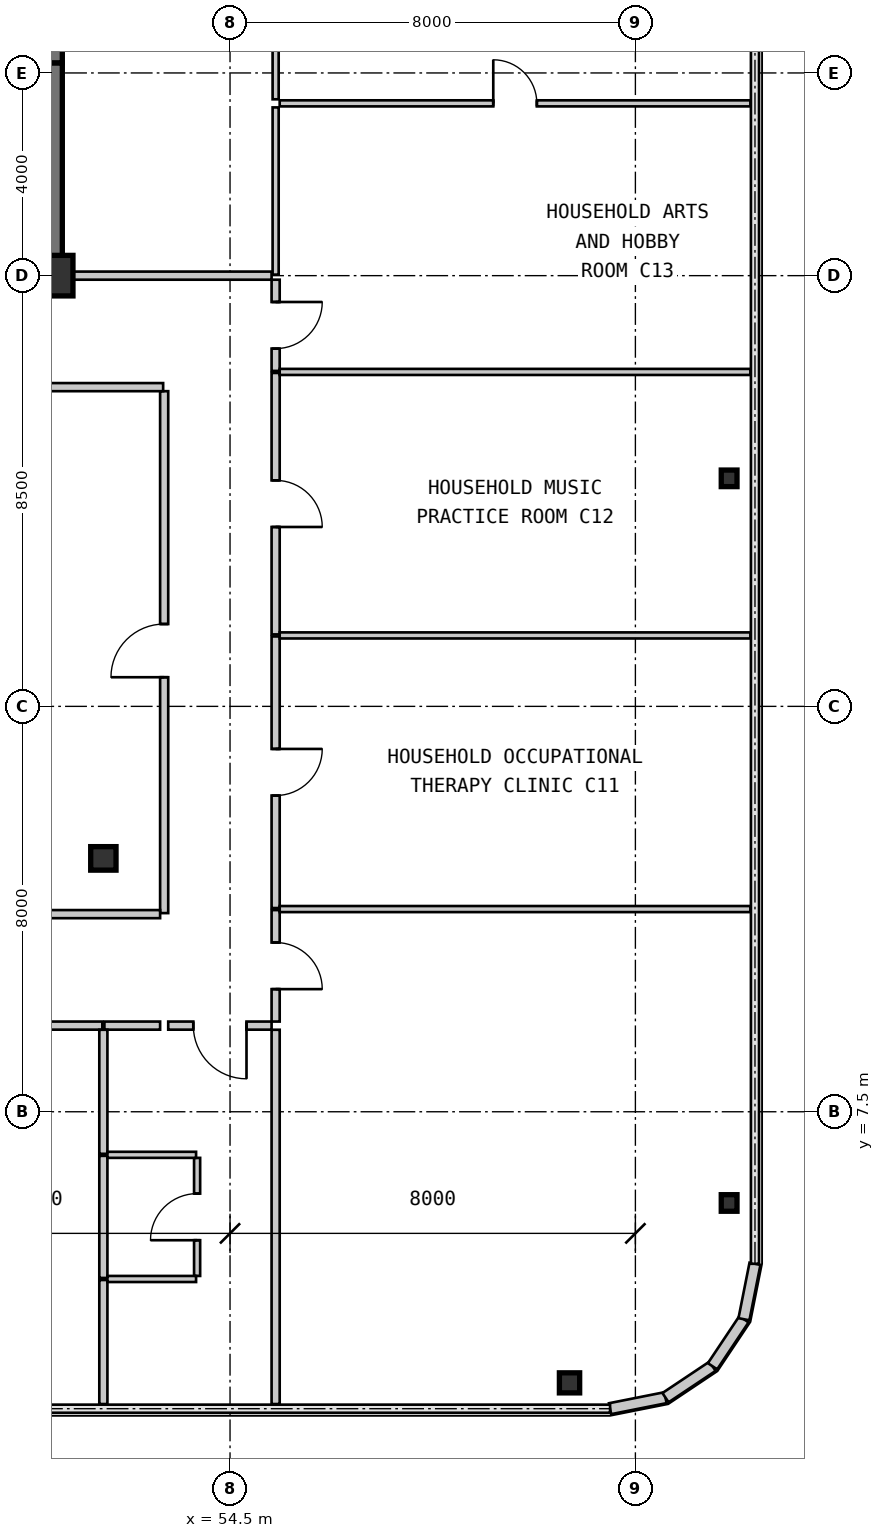
"""IFC4 building model, lengths in metres.
Left out: names, types, materials, properties, quantities, classifications, styles, units other than length and angle.
Written with IfcOpenShell. Run it as: python <this file> out.ifc"""

import sys

from ifc_helpers import new_model, si_unit, direction, frame, frame_2d, origin, origin_2d, place, context, subcontext, project, spatial, rectangle, i_section, extrude, source, transform, mapped, element, fill, save


model = new_model("IFC4")
c1 = context("Model", 3, precision=1e-05, world=origin(), true_north=direction((0.0, 1.0)))
c2 = subcontext(c1, "Body", "Model", "MODEL_VIEW")
j1 = project(units=[si_unit("LENGTHUNIT", "METRE"), si_unit("PLANEANGLEUNIT", "RADIAN")], contexts=[c1])
p1 = place(None, origin())
s1 = spatial("IfcSite", under=j1, at=p1, CompositionType="ELEMENT")
p2 = place(p1, origin())
s2 = spatial("IfcBuilding", under=s1, at=p2, CompositionType="ELEMENT")
p3 = place(p2, frame((0.0, 0.0, 51.45)))
s3 = spatial("IfcBuildingStorey", under=s2, at=p3, CompositionType="ELEMENT", Elevation=51.45)
m1 = source(origin(), c2, "Body", "SweptSolid", [
    extrude(rectangle(XDim=0.8, YDim=0.8, at=origin_2d()), origin(), (0.0, 0.0, 1.0), 3.15),
])
p4 = place(p3, frame((51.0, 24.0, 0.0), z_axis=(0.0, 0.0, 1.0), x_axis=(1.0, 0.0, 0.0)))
e1 = element("IfcColumn", 1, at=p4, inside=s3, PredefinedType="COLUMN", context=c2, shape_type="MappedRepresentation", body=[
    mapped(m1, transform((0.0, 0.0, 0.0), scale=1.0)),
])
m2 = source(origin(), c2, "Body", "SweptSolid", [
    extrude(i_section(OverallWidth=0.5, OverallDepth=0.464, WebThickness=0.022, FlangeThickness=0.034, at=origin_2d()), origin(), (0.0, 0.0, 1.0), 3.15),
])
p5 = place(p3, frame((52.0, 12.5, 0.0), z_axis=(0.0, 0.0, 1.0), x_axis=(1.0, 0.0, 0.0)))
e2 = element("IfcColumn", 2, at=p5, inside=s3, PredefinedType="COLUMN", context=c2, shape_type="MappedRepresentation", body=[
    mapped(m2, transform((0.0, 0.0, 0.0), scale=1.0)),
])
m3 = source(origin(), c2, "Body", "SweptSolid", [
    extrude(i_section(OverallWidth=0.4, OverallDepth=0.396, WebThickness=0.022, FlangeThickness=0.034, at=origin_2d()), origin(), (0.0, 0.0, 1.0), 3.15),
])
p6 = place(p3, frame((61.2, 2.15, 0.0), z_axis=(0.0, 0.0, 1.0), x_axis=(1.0, 0.0, 0.0)))
e3 = element("IfcColumn", 3, at=p6, inside=s3, PredefinedType="COLUMN", context=c2, shape_type="MappedRepresentation", body=[
    mapped(m3, transform((0.0, 0.0, 0.0), scale=1.0)),
])
m4 = source(origin(), c2, "Body", "SweptSolid", [
    extrude(i_section(OverallWidth=0.311, OverallDepth=0.327, WebThickness=0.016, FlangeThickness=0.025, at=origin_2d()), origin(), (0.0, 0.0, 1.0), 3.15),
])
for number, where, z_axis, x_axis in (
    (4, (64.35, 5.7, 0.0), (0.0, 0.0, 1.0), (1.0, 0.0, 0.0)),
    (5, (64.35, 20.0, 0.0), (0.0, 0.0, 1.0), (1.0, 0.0, 0.0)),
):
    element("IfcColumn", number, at=place(p3, frame(where, z_axis=z_axis, x_axis=x_axis)), inside=s3, PredefinedType="COLUMN", context=c2, shape_type="MappedRepresentation", body=[
        mapped(m4, transform((0.0, 0.0, 0.0), scale=1.0)),
    ])
m5 = source(origin(), c2, "Body", "SweptSolid", [
    extrude(rectangle(XDim=1.116, YDim=0.22, at=frame_2d((0.558, 0.0))), origin(), (0.0, 0.0, 1.0), 2.93),
])
for number, where, z_axis, x_axis in (
    (6, (62.0, 1.64, 0.0), (0.0, 0.0, 1.0), (0.981, 0.195, 0.0)),
    (7, (63.094, 1.858, 0.0), (0.0, 0.0, 1.0), (0.831, 0.556, 0.0)),
    (8, (64.022, 2.478, 0.0), (0.0, 0.0, 1.0), (0.556, 0.831, 0.0)),
    (9, (64.642, 3.406, 0.0), (0.0, 0.0, 1.0), (0.195, 0.981, 0.0)),
):
    element("IfcWall", number, at=place(p3, frame(where, z_axis=z_axis, x_axis=x_axis)), inside=s3, PredefinedType="SOLIDWALL", context=c2, shape_type="MappedRepresentation", body=[
        mapped(m5, transform((0.0, 0.0, 0.0), scale=1.0)),
    ])
m6 = source(origin(), c2, "Body", "SweptSolid", [
    extrude(rectangle(XDim=4.01, YDim=0.38, at=frame_2d((2.005, 0.0))), origin(), (0.0, 0.0, 1.0), 2.93),
])
p7 = place(p3, frame((51.0, 24.19, 0.0), z_axis=(0.0, 0.0, 1.0), x_axis=(0.0, 1.0, 0.0)))
e10 = element("IfcWall", 10, at=p7, inside=s3, PredefinedType="SHEAR", context=c2, shape_type="MappedRepresentation", body=[
    mapped(m6, transform((0.0, 0.0, 0.0), scale=1.0)),
])
m7 = source(origin(), c2, "Body", "SweptSolid", [
    extrude(rectangle(XDim=3.61, YDim=0.38, at=frame_2d((1.805, 0.0))), origin(), (0.0, 0.0, 1.0), 2.93),
])
p8 = place(p3, frame((51.0, 28.2, 0.0), z_axis=(0.0, 0.0, 1.0), x_axis=(0.0, 1.0, 0.0)))
e11 = element("IfcWall", 11, at=p8, inside=s3, PredefinedType="SHEAR", context=c2, shape_type="MappedRepresentation", body=[
    mapped(m7, transform((0.0, 0.0, 0.0), scale=1.0)),
])
m8 = source(origin(), c2, "Body", "SweptSolid", [
    extrude(rectangle(XDim=4.98, YDim=0.38, at=frame_2d((2.49, 0.0))), origin(), (0.0, 0.0, 1.0), 2.93),
])
p9 = place(p3, frame((46.21, 24.0, 0.0), z_axis=(0.0, 0.0, 1.0), x_axis=(1.0, 0.0, 0.0)))
e12 = element("IfcWall", 12, at=p9, inside=s3, PredefinedType="SHEAR", context=c2, shape_type="MappedRepresentation", body=[
    mapped(m8, transform((0.0, 0.0, 0.0), scale=1.0)),
])
m9 = source(origin(), c2, "Body", "SweptSolid", [
    extrude(rectangle(XDim=10.3, YDim=0.16, at=frame_2d((5.15, 0.0))), origin(), (0.0, 0.0, 1.0), 2.93),
])
p10 = place(p3, frame((53.2, 11.42, 0.0), z_axis=(0.0, 0.0, 1.0), x_axis=(0.0, 1.0, 0.0)))
e13 = element("IfcWall", 13, at=p10, inside=s3, PredefinedType="PARTITIONING", context=c2, shape_type="MappedRepresentation", body=[
    mapped(m9, transform((0.0, 0.0, 0.0), scale=1.0)),
])
m10 = source(origin(), c2, "Body", "SweptSolid", [
    extrude(rectangle(XDim=1.05, YDim=2.1, at=frame_2d((0.525, 1.05))), frame((0.0, 0.09, 0.0), z_axis=(0.0, -1.0, 0.0), x_axis=(1.0, 0.0, 0.0)), (0.0, 0.0, 1.0), 0.18),
])
p11 = place(p10, frame((4.655, 0.0, 0.0)))
e14 = element("IfcOpeningElement", 14, at=p11, cuts=e13, PredefinedType="OPENING", context=c2, shape_type="MappedRepresentation", body=[
    mapped(m10, transform((0.0, 0.0, 0.0), scale=1.0)),
])
m11 = source(origin(), c2, "Body", "SweptSolid", [
    extrude(rectangle(XDim=7.56, YDim=0.16, at=frame_2d((3.78, 0.0))), origin(), (0.0, 0.0, 1.0), 2.93),
])
p12 = place(p3, frame((53.18, 21.8, 0.0), z_axis=(0.0, 0.0, 1.0), x_axis=(-1.0, 0.0, 0.0)))
e15 = element("IfcWall", 15, at=p12, inside=s3, PredefinedType="PARTITIONING", context=c2, shape_type="MappedRepresentation", body=[
    mapped(m11, transform((0.0, 0.0, 0.0), scale=1.0)),
])
m12 = source(origin(), c2, "Body", "SweptSolid", [
    extrude(rectangle(XDim=2.04, YDim=0.16, at=frame_2d((1.02, 0.0))), origin(), (0.0, 0.0, 1.0), 2.93),
])
p13 = place(p3, frame((55.32, 9.2, 0.0), z_axis=(0.0, 0.0, 1.0), x_axis=(-1.0, 0.0, 0.0)))
e16 = element("IfcWall", 16, at=p13, inside=s3, PredefinedType="PARTITIONING", context=c2, shape_type="MappedRepresentation", body=[
    mapped(m12, transform((0.0, 0.0, 0.0), scale=1.0)),
])
p14 = place(p13, frame((0.495, 0.0, 0.0)))
e17 = element("IfcOpeningElement", 17, at=p14, cuts=e16, PredefinedType="OPENING", context=c2, shape_type="MappedRepresentation", body=[
    mapped(m10, transform((0.0, 0.0, 0.0), scale=1.0)),
])
m13 = source(origin(), c2, "Body", "SweptSolid", [
    extrude(rectangle(XDim=2.2, YDim=0.16, at=frame_2d((1.1, 0.0))), origin(), (0.0, 0.0, 1.0), 2.93),
])
p15 = place(p3, frame((55.4, 11.48, 0.0), z_axis=(0.0, 0.0, 1.0), x_axis=(0.0, -1.0, 0.0)))
e18 = element("IfcWall", 18, at=p15, inside=s3, PredefinedType="PARTITIONING", context=c2, shape_type="MappedRepresentation", body=[
    mapped(m13, transform((0.0, 0.0, 0.0), scale=1.0)),
])
m14 = source(origin(), c2, "Body", "SweptSolid", [
    extrude(rectangle(XDim=0.92, YDim=2.1, at=frame_2d((0.46, 1.05))), frame((0.0, 0.09, 0.0), z_axis=(0.0, -1.0, 0.0), x_axis=(1.0, 0.0, 0.0)), (0.0, 0.0, 1.0), 0.18),
])
p16 = place(p15, frame((0.64, 0.0, 0.0)))
e19 = element("IfcOpeningElement", 19, at=p16, cuts=e18, PredefinedType="OPENING", context=c2, shape_type="MappedRepresentation", body=[
    mapped(m14, transform((0.0, 0.0, 0.0), scale=1.0)),
])
m15 = source(origin(), c2, "Body", "SweptSolid", [
    extrude(rectangle(XDim=5.36, YDim=0.16, at=frame_2d((2.68, 0.0))), origin(), (0.0, 0.0, 1.0), 2.93),
])
p17 = place(p3, frame((55.4, 16.88, 0.0), z_axis=(0.0, 0.0, 1.0), x_axis=(0.0, -1.0, 0.0)))
e20 = element("IfcWall", 20, at=p17, inside=s3, PredefinedType="PARTITIONING", context=c2, shape_type="MappedRepresentation", body=[
    mapped(m15, transform((0.0, 0.0, 0.0), scale=1.0)),
])
p18 = place(p17, frame((2.22, 0.0, 0.0)))
e21 = element("IfcOpeningElement", 21, at=p18, cuts=e20, PredefinedType="OPENING", context=c2, shape_type="MappedRepresentation", body=[
    mapped(m14, transform((0.0, 0.0, 0.0), scale=1.0)),
])
m16 = source(origin(), c2, "Body", "SweptSolid", [
    extrude(rectangle(XDim=5.16, YDim=0.16, at=frame_2d((2.58, 0.0))), origin(), (0.0, 0.0, 1.0), 2.93),
])
p19 = place(p3, frame((55.4, 22.08, 0.0), z_axis=(0.0, 0.0, 1.0), x_axis=(0.0, -1.0, 0.0)))
e22 = element("IfcWall", 22, at=p19, inside=s3, PredefinedType="PARTITIONING", context=c2, shape_type="MappedRepresentation", body=[
    mapped(m16, transform((0.0, 0.0, 0.0), scale=1.0)),
])
p20 = place(p19, frame((2.12, 0.0, 0.0)))
e23 = element("IfcOpeningElement", 23, at=p20, cuts=e22, PredefinedType="OPENING", context=c2, shape_type="MappedRepresentation", body=[
    mapped(m14, transform((0.0, 0.0, 0.0), scale=1.0)),
])
m17 = source(origin(), c2, "Body", "SweptSolid", [
    extrude(rectangle(XDim=1.8, YDim=0.16, at=frame_2d((0.9, 0.0))), origin(), (0.0, 0.0, 1.0), 2.93),
])
p21 = place(p3, frame((55.4, 23.92, 0.0), z_axis=(0.0, 0.0, 1.0), x_axis=(0.0, -1.0, 0.0)))
e24 = element("IfcWall", 24, at=p21, inside=s3, PredefinedType="PARTITIONING", context=c2, shape_type="MappedRepresentation", body=[
    mapped(m17, transform((0.0, 0.0, 0.0), scale=1.0)),
])
p22 = place(p21, frame((0.44, 0.0, 0.0)))
e25 = element("IfcOpeningElement", 25, at=p22, cuts=e24, PredefinedType="OPENING", context=c2, shape_type="MappedRepresentation", body=[
    mapped(m14, transform((0.0, 0.0, 0.0), scale=1.0)),
])
m18 = source(origin(), c2, "Body", "SweptSolid", [
    extrude(rectangle(XDim=4.13, YDim=0.16, at=frame_2d((2.065, 0.0))), origin(), (0.0, 0.0, 1.0), 2.93),
])
p23 = place(p3, frame((51.19, 24.0, 0.0), z_axis=(0.0, 0.0, 1.0), x_axis=(1.0, 0.0, 0.0)))
e26 = element("IfcWall", 26, at=p23, inside=s3, PredefinedType="PARTITIONING", context=c2, shape_type="MappedRepresentation", body=[
    mapped(m18, transform((0.0, 0.0, 0.0), scale=1.0)),
])
m19 = source(origin(), c2, "Body", "SweptSolid", [
    extrude(rectangle(XDim=7.5, YDim=0.16, at=frame_2d((3.75, 0.0))), origin(), (0.0, 0.0, 1.0), 2.93),
])
p24 = place(p3, frame((45.62, 11.4, 0.0), z_axis=(0.0, 0.0, 1.0), x_axis=(1.0, 0.0, 0.0)))
e27 = element("IfcWall", 27, at=p24, inside=s3, PredefinedType="PARTITIONING", context=c2, shape_type="MappedRepresentation", body=[
    mapped(m19, transform((0.0, 0.0, 0.0), scale=1.0)),
])
m20 = source(origin(), c2, "Body", "SweptSolid", [
    extrude(rectangle(XDim=3.76, YDim=0.16, at=frame_2d((1.88, 0.0))), origin(), (0.0, 0.0, 1.0), 2.93),
])
p25 = place(p3, frame((51.98, 9.2, 0.0), z_axis=(0.0, 0.0, 1.0), x_axis=(-1.0, 0.0, 0.0)))
e28 = element("IfcWall", 28, at=p25, inside=s3, PredefinedType="PARTITIONING", context=c2, shape_type="MappedRepresentation", body=[
    mapped(m20, transform((0.0, 0.0, 0.0), scale=1.0)),
])
p26 = place(p25, frame((1.355, 0.0, 0.0)))
e29 = element("IfcOpeningElement", 29, at=p26, cuts=e28, PredefinedType="OPENING", context=c2, shape_type="MappedRepresentation", body=[
    mapped(m10, transform((0.0, 0.0, 0.0), scale=1.0)),
])
m21 = source(origin(), c2, "Body", "SweptSolid", [
    extrude(rectangle(XDim=1.1, YDim=0.16, at=frame_2d((0.55, 0.0))), origin(), (0.0, 0.0, 1.0), 2.93),
])
p27 = place(p3, frame((53.12, 9.2, 0.0), z_axis=(0.0, 0.0, 1.0), x_axis=(-1.0, 0.0, 0.0)))
e30 = element("IfcWall", 30, at=p27, inside=s3, PredefinedType="PARTITIONING", context=c2, shape_type="MappedRepresentation", body=[
    mapped(m21, transform((0.0, 0.0, 0.0), scale=1.0)),
])
m22 = source(origin(), c2, "Body", "SweptSolid", [
    extrude(rectangle(XDim=2.448, YDim=0.16, at=frame_2d((1.224, 0.0))), origin(), (0.0, 0.0, 1.0), 2.93),
])
for number, where, z_axis, x_axis in (
    (31, (52.0, 4.18, 0.0), (0.0, 0.0, 1.0), (0.0, -1.0, 0.0)),
    (32, (52.0, 9.118, 0.0), (0.0, 0.0, 1.0), (0.0, -1.0, 0.0)),
):
    element("IfcWall", number, at=place(p3, frame(where, z_axis=z_axis, x_axis=x_axis)), inside=s3, PredefinedType="PARTITIONING", context=c2, shape_type="MappedRepresentation", body=[
        mapped(m22, transform((0.0, 0.0, 0.0), scale=1.0)),
    ])
m23 = source(origin(), c2, "Body", "SweptSolid", [
    extrude(rectangle(XDim=2.41, YDim=0.16, at=frame_2d((1.205, 0.0))), origin(), (0.0, 0.0, 1.0), 2.93),
])
p28 = place(p3, frame((52.0, 6.63, 0.0), z_axis=(0.0, 0.0, 1.0), x_axis=(0.0, -1.0, 0.0)))
e33 = element("IfcWall", 33, at=p28, inside=s3, PredefinedType="PARTITIONING", context=c2, shape_type="MappedRepresentation", body=[
    mapped(m23, transform((0.0, 0.0, 0.0), scale=1.0)),
])
m24 = source(origin(), c2, "Body", "SweptSolid", [
    extrude(rectangle(XDim=2.33, YDim=0.12, at=frame_2d((1.165, 0.0))), origin(), (0.0, 0.0, 1.0), 2.93),
])
p29 = place(p3, frame((53.85, 4.26, 0.0), z_axis=(0.0, 0.0, 1.0), x_axis=(0.0, 1.0, 0.0)))
e34 = element("IfcWall", 34, at=p29, inside=s3, PredefinedType="PARTITIONING", context=c2, shape_type="MappedRepresentation", body=[
    mapped(m24, transform((0.0, 0.0, 0.0), scale=1.0)),
])
m25 = source(origin(), c2, "Body", "SweptSolid", [
    extrude(rectangle(XDim=0.92, YDim=2.1, at=frame_2d((0.46, 1.05))), frame((0.0, 0.07, 0.0), z_axis=(0.0, -1.0, 0.0), x_axis=(1.0, 0.0, 0.0)), (0.0, 0.0, 1.0), 0.14),
])
p30 = place(p29, frame((0.705, 0.0, 0.0)))
e35 = element("IfcOpeningElement", 35, at=p30, cuts=e34, PredefinedType="OPENING", context=c2, shape_type="MappedRepresentation", body=[
    mapped(m25, transform((0.0, 0.0, 0.0), scale=1.0)),
])
m26 = source(origin(), c2, "Body", "SweptSolid", [
    extrude(rectangle(XDim=1.75, YDim=0.12, at=frame_2d((0.875, 0.0))), origin(), (0.0, 0.0, 1.0), 2.93),
])
for number, where, z_axis, x_axis in (
    (36, (52.08, 4.2, 0.0), (0.0, 0.0, 1.0), (1.0, 0.0, 0.0)),
    (37, (53.83, 6.65, 0.0), (0.0, 0.0, 1.0), (-1.0, 0.0, 0.0)),
):
    element("IfcWall", number, at=place(p3, frame(where, z_axis=z_axis, x_axis=x_axis)), inside=s3, PredefinedType="PARTITIONING", context=c2, shape_type="MappedRepresentation", body=[
        mapped(m26, transform((0.0, 0.0, 0.0), scale=1.0)),
    ])
m27 = source(origin(), c2, "Body", "SweptSolid", [
    extrude(rectangle(XDim=7.386, YDim=0.16, at=frame_2d((3.693, 0.0))), origin(), (0.0, 0.0, 1.0), 2.93),
])
p31 = place(p3, frame((55.4, 9.118, 0.0), z_axis=(0.0, 0.0, 1.0), x_axis=(0.0, -1.0, 0.0)))
e38 = element("IfcWall", 38, at=p31, inside=s3, PredefinedType="PARTITIONING", context=c2, shape_type="MappedRepresentation", body=[
    mapped(m27, transform((0.0, 0.0, 0.0), scale=1.0)),
])
m28 = source(origin(), c2, "Body", "SweptSolid", [
    extrude(rectangle(XDim=9.29, YDim=0.12, at=frame_2d((4.645, 0.0))), origin(), (0.0, 0.0, 1.0), 2.93),
])
for number, where, z_axis, x_axis in (
    (39, (55.48, 11.5, 0.0), (0.0, 0.0, 1.0), (1.0, 0.0, 0.0)),
    (40, (55.48, 16.9, 0.0), (0.0, 0.0, 1.0), (1.0, 0.0, 0.0)),
    (41, (55.48, 22.1, 0.0), (0.0, 0.0, 1.0), (1.0, 0.0, 0.0)),
):
    element("IfcWall", number, at=place(p3, frame(where, z_axis=z_axis, x_axis=x_axis)), inside=s3, PredefinedType="PARTITIONING", context=c2, shape_type="MappedRepresentation", body=[
        mapped(m28, transform((0.0, 0.0, 0.0), scale=1.0)),
    ])
p32 = place(p3, frame((55.48, 27.4, 0.0), z_axis=(0.0, 0.0, 1.0), x_axis=(1.0, 0.0, 0.0)))
e42 = element("IfcWall", 42, at=p32, inside=s3, PredefinedType="PARTITIONING", context=c2, shape_type="MappedRepresentation", body=[
    mapped(m28, transform((0.0, 0.0, 0.0), scale=1.0)),
])
m29 = source(origin(), c2, "Body", "SweptSolid", [
    extrude(rectangle(XDim=0.86, YDim=2.1, at=frame_2d((0.43, 1.05))), frame((0.0, 0.07, 0.0), z_axis=(0.0, -1.0, 0.0), x_axis=(1.0, 0.0, 0.0)), (0.0, 0.0, 1.0), 0.14),
])
p33 = place(p32, frame((4.215, 0.0, 0.0)))
e43 = element("IfcOpeningElement", 43, at=p33, cuts=e42, PredefinedType="OPENING", context=c2, shape_type="MappedRepresentation", body=[
    mapped(m29, transform((0.0, 0.0, 0.0), scale=1.0)),
])
m30 = source(origin(), c2, "Body", "SweptSolid", [
    extrude(rectangle(XDim=3.3, YDim=0.12, at=frame_2d((1.65, 0.0))), origin(), (0.0, 0.0, 1.0), 2.93),
])
p34 = place(p3, frame((55.4, 24.02, 0.0), z_axis=(0.0, 0.0, 1.0), x_axis=(0.0, 1.0, 0.0)))
e44 = element("IfcWall", 44, at=p34, inside=s3, PredefinedType="PARTITIONING", context=c2, shape_type="MappedRepresentation", body=[
    mapped(m30, transform((0.0, 0.0, 0.0), scale=1.0)),
])
m31 = source(origin(), c2, "Body", "SweptSolid", [
    extrude(rectangle(XDim=4.44, YDim=0.12, at=frame_2d((2.22, 0.0))), origin(), (0.0, 0.0, 1.0), 2.93),
])
p35 = place(p3, frame((55.4, 27.48, 0.0), z_axis=(0.0, 0.0, 1.0), x_axis=(0.0, 1.0, 0.0)))
e45 = element("IfcWall", 45, at=p35, inside=s3, PredefinedType="PARTITIONING", context=c2, shape_type="MappedRepresentation", body=[
    mapped(m31, transform((0.0, 0.0, 0.0), scale=1.0)),
])
m32 = source(origin(), c2, "Body", "SweptSolid", [
    extrude(rectangle(XDim=1.05, YDim=2.1, at=frame_2d((0.525, 1.05))), frame((0.0, 0.025, 0.0), z_axis=(0.0, -1.0, 0.0), x_axis=(1.0, 0.0, 0.0)), (0.0, 0.0, 1.0), 0.05),
])
p36 = place(p11, origin())
e46 = element("IfcDoor", 46, at=p36, inside=s3, OperationType="SINGLE_SWING_LEFT", PredefinedType="DOOR", context=c2, shape_type="MappedRepresentation", body=[
    mapped(m32, transform((0.0, 0.0, 0.0), scale=1.0)),
])
fill(e14, e46)
p37 = place(p14, origin())
e47 = element("IfcDoor", 47, at=p37, inside=s3, OperationType="SINGLE_SWING_LEFT", PredefinedType="DOOR", context=c2, shape_type="MappedRepresentation", body=[
    mapped(m32, transform((0.0, 0.0, 0.0), scale=1.0)),
])
fill(e17, e47)
m33 = source(origin(), c2, "Body", "SweptSolid", [
    extrude(rectangle(XDim=0.92, YDim=2.1, at=frame_2d((0.46, 1.05))), frame((0.0, 0.025, 0.0), z_axis=(0.0, -1.0, 0.0), x_axis=(1.0, 0.0, 0.0)), (0.0, 0.0, 1.0), 0.05),
])
p38 = place(p16, origin())
e48 = element("IfcDoor", 48, at=p38, inside=s3, OperationType="SINGLE_SWING_RIGHT", PredefinedType="DOOR", context=c2, shape_type="MappedRepresentation", body=[
    mapped(m33, transform((0.0, 0.0, 0.0), scale=1.0)),
])
fill(e19, e48)
p39 = place(p18, origin())
e49 = element("IfcDoor", 49, at=p39, inside=s3, OperationType="SINGLE_SWING_LEFT", PredefinedType="DOOR", context=c2, shape_type="MappedRepresentation", body=[
    mapped(m33, transform((0.0, 0.0, 0.0), scale=1.0)),
])
fill(e21, e49)
p40 = place(p20, origin())
e50 = element("IfcDoor", 50, at=p40, inside=s3, OperationType="SINGLE_SWING_RIGHT", PredefinedType="DOOR", context=c2, shape_type="MappedRepresentation", body=[
    mapped(m33, transform((0.0, 0.0, 0.0), scale=1.0)),
])
fill(e23, e50)
p41 = place(p22, origin())
e51 = element("IfcDoor", 51, at=p41, inside=s3, OperationType="SINGLE_SWING_LEFT", PredefinedType="DOOR", context=c2, shape_type="MappedRepresentation", body=[
    mapped(m33, transform((0.0, 0.0, 0.0), scale=1.0)),
])
fill(e25, e51)
p42 = place(p30, origin())
e52 = element("IfcDoor", 52, at=p42, inside=s3, OperationType="SINGLE_SWING_LEFT", PredefinedType="DOOR", context=c2, shape_type="MappedRepresentation", body=[
    mapped(m33, transform((0.0, 0.0, 0.0), scale=1.0)),
])
fill(e35, e52)
m34 = source(origin(), c2, "Body", "SweptSolid", [
    extrude(rectangle(XDim=0.86, YDim=2.1, at=frame_2d((0.43, 1.05))), frame((0.0, 0.025, 0.0), z_axis=(0.0, -1.0, 0.0), x_axis=(1.0, 0.0, 0.0)), (0.0, 0.0, 1.0), 0.05),
])
p43 = place(p33, origin())
e53 = element("IfcDoor", 53, at=p43, inside=s3, OperationType="SINGLE_SWING_LEFT", PredefinedType="DOOR", context=c2, shape_type="MappedRepresentation", body=[
    mapped(m34, transform((0.0, 0.0, 0.0), scale=1.0)),
])
fill(e43, e53)
save(model, sys.argv[1])
